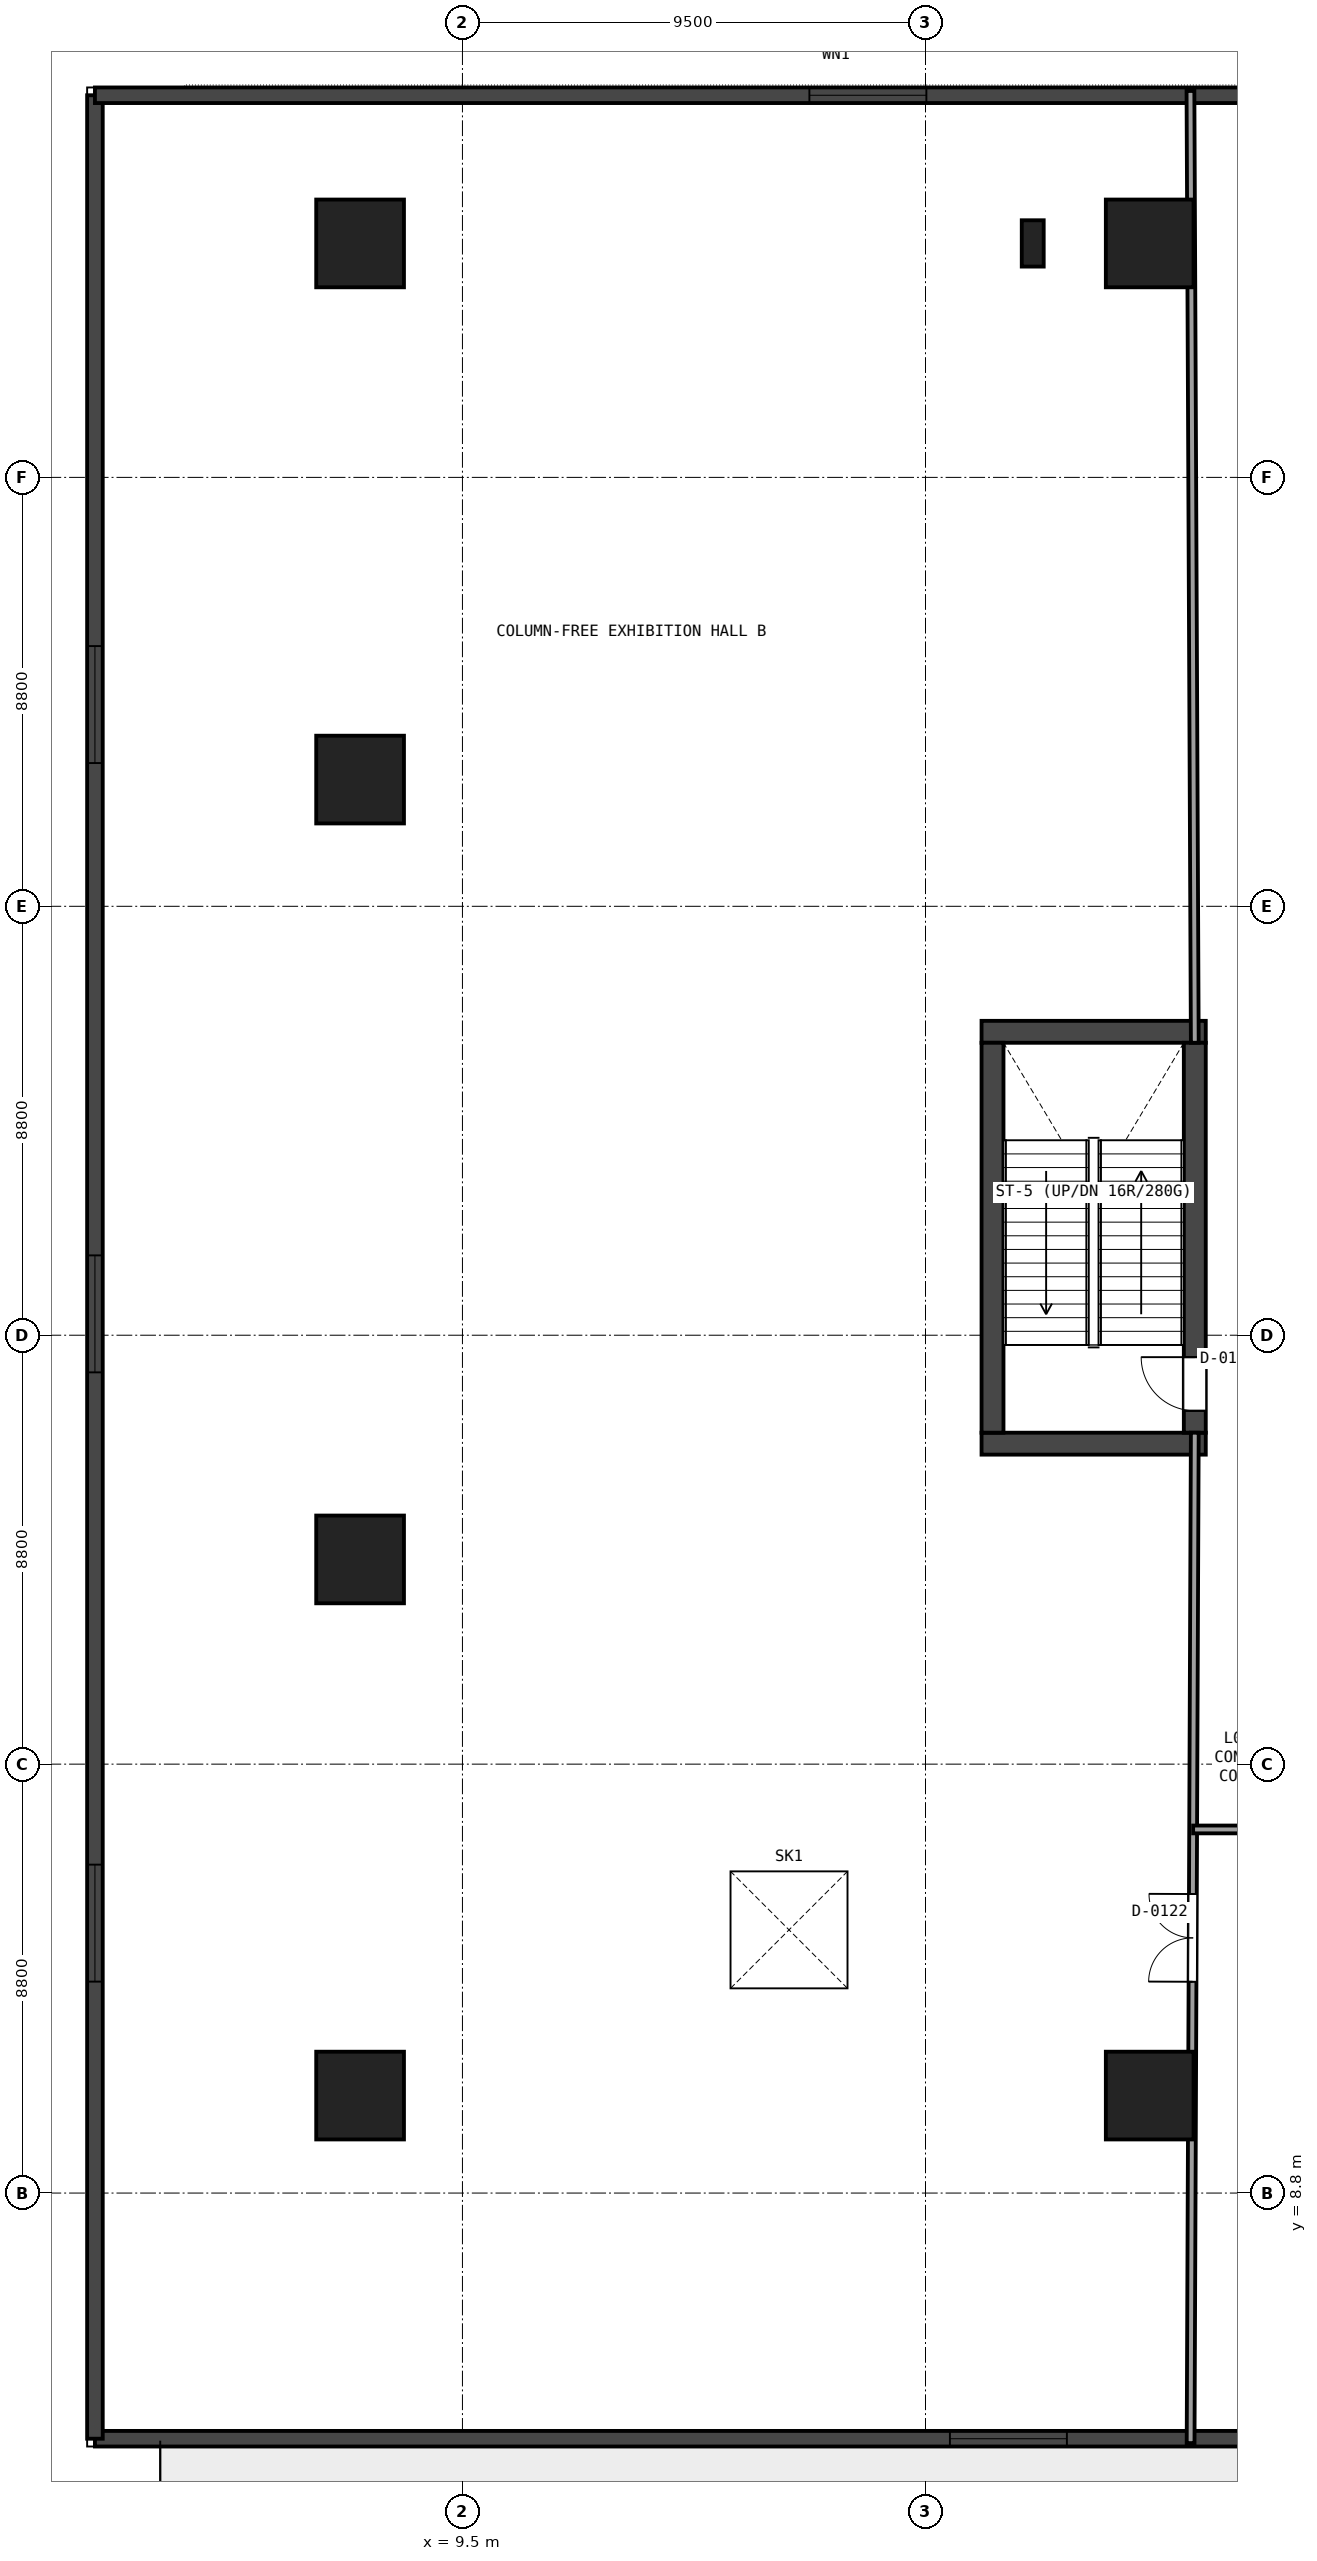
"""IFC4 building model, lengths in metres.
Left out: names, types, materials, properties, quantities, classifications, styles, units other than length and angle.
Written with IfcOpenShell. Run it as: python <this file> out.ifc"""

import sys

from ifc_helpers import new_model, si_unit, direction, frame, frame_2d, origin, origin_2d, place, context, subcontext, project, spatial, rectangle, extrude, element, fill, save


model = new_model("IFC4")
c1 = context("Model", 3, precision=1e-05, world=origin(), true_north=direction((0.0, 1.0)))
c2 = subcontext(c1, "Body", "Model", "MODEL_VIEW")
j1 = project(units=[si_unit("LENGTHUNIT", "METRE"), si_unit("PLANEANGLEUNIT", "RADIAN")], contexts=[c1])
p1 = place(None, origin())
s1 = spatial("IfcSite", under=j1, at=p1, CompositionType="ELEMENT")
p2 = place(p1, origin())
s2 = spatial("IfcBuilding", under=s1, at=p2, CompositionType="ELEMENT")
p3 = place(p2, frame((0.0, 0.0, 5.4)))
s3 = spatial("IfcBuildingStorey", under=s2, at=p3, CompositionType="ELEMENT", Elevation=5.4)
for number, where, z_axis, x_axis in (
    (1, (20.15, 24.175, 0.0), (0.0, 0.0, 1.0), (1.0, 0.0, 0.0)),
    (2, (20.15, 32.625, 0.0), (0.0, 0.0, 1.0), (1.0, 0.0, 0.0)),
):
    element("IfcWall", number, at=place(p3, frame(where, z_axis=z_axis, x_axis=x_axis)), inside=s3, PredefinedType="SHEAR", context=c2, shape_type="SweptSolid", body=[
        extrude(rectangle(XDim=4.6, YDim=0.45, at=frame_2d((2.3, 0.0))), origin(), (0.0, 0.0, 1.0), 5.05),
    ])
p4 = place(p3, frame((20.375, 24.4, 0.0), z_axis=(0.0, 0.0, 1.0), x_axis=(0.0, 1.0, 0.0)))
e3 = element("IfcWall", 3, at=p4, inside=s3, PredefinedType="SHEAR", context=c2, shape_type="SweptSolid", body=[
    extrude(rectangle(XDim=8.0, YDim=0.45, at=frame_2d((4.0, 0.0))), origin(), (0.0, 0.0, 1.0), 5.05),
])
p5 = place(p3, frame((24.525, 24.4, 0.0), z_axis=(0.0, 0.0, 1.0), x_axis=(0.0, 1.0, 0.0)))
e4 = element("IfcWall", 4, at=p5, inside=s3, PredefinedType="SHEAR", context=c2, shape_type="SweptSolid", body=[
    extrude(rectangle(XDim=8.0, YDim=0.45, at=frame_2d((4.0, 0.0))), origin(), (0.0, 0.0, 1.0), 5.05),
])
p6 = place(p5, frame((0.45, 0.0, 0.0)))
e5 = element("IfcOpeningElement", 5, at=p6, cuts=e4, PredefinedType="OPENING", context=c2, shape_type="SweptSolid", body=[
    extrude(rectangle(XDim=1.1, YDim=2.15, at=frame_2d((0.55, 1.075))), frame((0.0, 0.235, 0.0), z_axis=(0.0, -1.0, 0.0), x_axis=(1.0, 0.0, 0.0)), (0.0, 0.0, 1.0), 0.47),
])
for number, where, z_axis, x_axis in (
    (6, (7.4, 10.8, 0.0), (0.0, 0.0, 1.0), (1.0, 0.0, 0.0)),
    (7, (23.6, 10.8, 0.0), (0.0, 0.0, 1.0), (1.0, 0.0, 0.0)),
    (8, (23.6, 48.8, 0.0), (0.0, 0.0, 1.0), (1.0, 0.0, 0.0)),
    (9, (7.4, 48.8, 0.0), (0.0, 0.0, 1.0), (1.0, 0.0, 0.0)),
    (10, (7.4, 37.8, 0.0), (0.0, 0.0, 1.0), (1.0, 0.0, 0.0)),
    (11, (7.4, 21.8, 0.0), (0.0, 0.0, 1.0), (1.0, 0.0, 0.0)),
):
    element("IfcColumn", number, at=place(p3, frame(where, z_axis=z_axis, x_axis=x_axis)), inside=s3, PredefinedType="COLUMN", context=c2, shape_type="SweptSolid", body=[
        extrude(rectangle(XDim=1.8, YDim=1.8, at=origin_2d()), origin(), (0.0, 0.0, 1.0), 5.05),
    ])
p7 = place(p3, frame((21.2, 48.8, 0.0), z_axis=(0.0, 0.0, 1.0), x_axis=(1.0, 0.0, 0.0)))
e12 = element("IfcColumn", 12, at=p7, inside=s3, PredefinedType="PILASTER", context=c2, shape_type="SweptSolid", body=[
    extrude(rectangle(XDim=0.45, YDim=0.95, at=origin_2d()), origin(), (0.0, 0.0, 1.0), 5.05),
])
p8 = place(p3, frame((74.04, 3.76, 0.0), z_axis=(0.0, 0.0, 1.0), x_axis=(-1.0, 0.0, 0.0)))
e13 = element("IfcWall", 13, at=p8, inside=s3, PredefinedType="SOLIDWALL", context=c2, shape_type="SweptSolid", body=[
    extrude(rectangle(XDim=72.08, YDim=0.32, at=frame_2d((36.04, 0.0))), origin(), (0.0, 0.0, 1.0), 5.05),
])
p9 = place(p8, frame((14.658, 0.0, 0.95)))
e14 = element("IfcOpeningElement", 14, at=p9, cuts=e13, PredefinedType="OPENING", context=c2, shape_type="SweptSolid", body=[
    extrude(rectangle(XDim=2.4, YDim=2.5, at=frame_2d((1.2, 1.25))), frame((0.0, 0.17, 0.0), z_axis=(0.0, -1.0, 0.0), x_axis=(1.0, 0.0, 0.0)), (0.0, 0.0, 1.0), 0.34),
])
p10 = place(p8, frame((52.139, 0.0, 0.95)))
e15 = element("IfcOpeningElement", 15, at=p10, cuts=e13, PredefinedType="OPENING", context=c2, shape_type="SweptSolid", body=[
    extrude(rectangle(XDim=2.4, YDim=2.5, at=frame_2d((1.2, 1.25))), frame((0.0, 0.17, 0.0), z_axis=(0.0, -1.0, 0.0), x_axis=(1.0, 0.0, 0.0)), (0.0, 0.0, 1.0), 0.34),
])
p11 = place(p8, frame((38.44, 0.0, 0.0)))
e16 = element("IfcOpeningElement", 16, at=p11, cuts=e13, PredefinedType="OPENING", context=c2, shape_type="SweptSolid", body=[
    extrude(rectangle(XDim=1.2, YDim=2.2, at=frame_2d((0.6, 1.1))), frame((0.0, 0.17, 0.0), z_axis=(0.0, -1.0, 0.0), x_axis=(1.0, 0.0, 0.0)), (0.0, 0.0, 1.0), 0.34),
])
p12 = place(p3, frame((1.96, 3.76, 0.0), z_axis=(0.0, 0.0, 1.0), x_axis=(0.0, 1.0, 0.0)))
e17 = element("IfcWall", 17, at=p12, inside=s3, PredefinedType="SOLIDWALL", context=c2, shape_type="SweptSolid", body=[
    extrude(rectangle(XDim=48.08, YDim=0.32, at=frame_2d((24.04, 0.0))), origin(), (0.0, 0.0, 1.0), 5.05),
])
p13 = place(p12, frame((9.378, 0.0, 0.95)))
e18 = element("IfcOpeningElement", 18, at=p13, cuts=e17, PredefinedType="OPENING", context=c2, shape_type="SweptSolid", body=[
    extrude(rectangle(XDim=2.4, YDim=2.5, at=frame_2d((1.2, 1.25))), frame((0.0, 0.17, 0.0), z_axis=(0.0, -1.0, 0.0), x_axis=(1.0, 0.0, 0.0)), (0.0, 0.0, 1.0), 0.34),
])
p14 = place(p12, frame((21.878, 0.0, 0.95)))
e19 = element("IfcOpeningElement", 19, at=p14, cuts=e17, PredefinedType="OPENING", context=c2, shape_type="SweptSolid", body=[
    extrude(rectangle(XDim=2.4, YDim=2.5, at=frame_2d((1.2, 1.25))), frame((0.0, 0.17, 0.0), z_axis=(0.0, -1.0, 0.0), x_axis=(1.0, 0.0, 0.0)), (0.0, 0.0, 1.0), 0.34),
])
p15 = place(p12, frame((34.379, 0.0, 0.95)))
e20 = element("IfcOpeningElement", 20, at=p15, cuts=e17, PredefinedType="OPENING", context=c2, shape_type="SweptSolid", body=[
    extrude(rectangle(XDim=2.4, YDim=2.5, at=frame_2d((1.2, 1.25))), frame((0.0, 0.17, 0.0), z_axis=(0.0, -1.0, 0.0), x_axis=(1.0, 0.0, 0.0)), (0.0, 0.0, 1.0), 0.34),
])
p16 = place(p3, frame((1.96, 51.84, 0.0), z_axis=(0.0, 0.0, 1.0), x_axis=(1.0, 0.0, 0.0)))
e21 = element("IfcWall", 21, at=p16, inside=s3, PredefinedType="SOLIDWALL", context=c2, shape_type="SweptSolid", body=[
    extrude(rectangle(XDim=72.08, YDim=0.32, at=frame_2d((36.04, 0.0))), origin(), (0.0, 0.0, 1.0), 5.05),
])
p17 = place(p16, frame((14.658, 0.0, 0.95)))
e22 = element("IfcOpeningElement", 22, at=p17, cuts=e21, PredefinedType="OPENING", context=c2, shape_type="SweptSolid", body=[
    extrude(rectangle(XDim=2.4, YDim=2.5, at=frame_2d((1.2, 1.25))), frame((0.0, 0.17, 0.0), z_axis=(0.0, -1.0, 0.0), x_axis=(1.0, 0.0, 0.0)), (0.0, 0.0, 1.0), 0.34),
])
p18 = place(p16, frame((33.398, 0.0, 0.95)))
e23 = element("IfcOpeningElement", 23, at=p18, cuts=e21, PredefinedType="OPENING", context=c2, shape_type="SweptSolid", body=[
    extrude(rectangle(XDim=2.4, YDim=2.5, at=frame_2d((1.2, 1.25))), frame((0.0, 0.17, 0.0), z_axis=(0.0, -1.0, 0.0), x_axis=(1.0, 0.0, 0.0)), (0.0, 0.0, 1.0), 0.34),
])
p19 = place(p16, frame((52.139, 0.0, 0.95)))
e24 = element("IfcOpeningElement", 24, at=p19, cuts=e21, PredefinedType="OPENING", context=c2, shape_type="SweptSolid", body=[
    extrude(rectangle(XDim=2.4, YDim=2.5, at=frame_2d((1.2, 1.25))), frame((0.0, 0.17, 0.0), z_axis=(0.0, -1.0, 0.0), x_axis=(1.0, 0.0, 0.0)), (0.0, 0.0, 1.0), 0.34),
])
p20 = place(p3, frame((24.439, 3.67, 0.0), z_axis=(0.0, 0.0, 1.0), x_axis=(0.004145530271, 0.999991407252, 0.0)))
e25 = element("IfcWall", 25, at=p20, inside=s3, PredefinedType="PARTITIONING", context=c2, shape_type="SweptSolid", body=[
    extrude(rectangle(XDim=20.73, YDim=0.16, at=frame_2d((10.365, 0.0))), origin(), (0.0, 0.0, 1.0), 4.123),
])
p21 = place(p20, frame((9.465, 0.0, 0.0)))
e26 = element("IfcOpeningElement", 26, at=p21, cuts=e25, PredefinedType="OPENING", context=c2, shape_type="SweptSolid", body=[
    extrude(rectangle(XDim=1.8, YDim=2.25, at=frame_2d((0.9, 1.125))), frame((0.0, 0.09, 0.0), z_axis=(0.0, -1.0, 0.0), x_axis=(1.0, 0.0, 0.0)), (0.0, 0.0, 1.0), 0.18),
])
p22 = place(p3, frame((24.525, 32.4, 0.0), z_axis=(0.0, 0.0, 1.0), x_axis=(-0.004550692375, 0.999989645546, 0.0)))
e27 = element("IfcWall", 27, at=p22, inside=s3, PredefinedType="PARTITIONING", context=c2, shape_type="SweptSolid", body=[
    extrude(rectangle(XDim=19.528, YDim=0.16, at=frame_2d((9.764, 0.0))), origin(), (0.0, 0.0, 1.0), 4.123),
])
p23 = place(p3, frame((57.4, 16.26, 0.0), z_axis=(0.0, 0.0, 1.0), x_axis=(-1.0, 0.0, 0.0)))
e28 = element("IfcWall", 28, at=p23, inside=s3, PredefinedType="PARTITIONING", context=c2, shape_type="SweptSolid", body=[
    extrude(rectangle(XDim=32.909, YDim=0.16, at=frame_2d((16.455, 0.0))), origin(), (0.0, 0.0, 1.0), 4.203),
])
p24 = place(p23, frame((15.955, 0.0, 0.0)))
e29 = element("IfcOpeningElement", 29, at=p24, cuts=e28, PredefinedType="OPENING", context=c2, shape_type="SweptSolid", body=[
    extrude(rectangle(XDim=1.0, YDim=2.15, at=frame_2d((0.5, 1.075))), frame((0.0, 0.09, 0.0), z_axis=(0.0, -1.0, 0.0), x_axis=(1.0, 0.0, 0.0)), (0.0, 0.0, 1.0), 0.18),
])
p25 = place(p17, origin())
e30 = element("IfcWindow", 30, at=p25, inside=s3, PartitioningType="SINGLE_PANEL", PredefinedType="WINDOW", context=c2, shape_type="SweptSolid", body=[
    extrude(rectangle(XDim=2.4, YDim=2.5, at=frame_2d((1.2, 1.25))), frame((0.0, 0.03, 0.0), z_axis=(0.0, -1.0, 0.0), x_axis=(1.0, 0.0, 0.0)), (0.0, 0.0, 1.0), 0.06),
])
fill(e22, e30)
p26 = place(p10, origin())
e31 = element("IfcWindow", 31, at=p26, inside=s3, PartitioningType="SINGLE_PANEL", PredefinedType="WINDOW", context=c2, shape_type="SweptSolid", body=[
    extrude(rectangle(XDim=2.4, YDim=2.5, at=frame_2d((1.2, 1.25))), frame((0.0, 0.03, 0.0), z_axis=(0.0, -1.0, 0.0), x_axis=(1.0, 0.0, 0.0)), (0.0, 0.0, 1.0), 0.06),
])
fill(e15, e31)
p27 = place(p13, origin())
e32 = element("IfcWindow", 32, at=p27, inside=s3, PartitioningType="SINGLE_PANEL", PredefinedType="WINDOW", context=c2, shape_type="SweptSolid", body=[
    extrude(rectangle(XDim=2.4, YDim=2.5, at=frame_2d((1.2, 1.25))), frame((0.0, 0.03, 0.0), z_axis=(0.0, -1.0, 0.0), x_axis=(1.0, 0.0, 0.0)), (0.0, 0.0, 1.0), 0.06),
])
fill(e18, e32)
p28 = place(p14, origin())
e33 = element("IfcWindow", 33, at=p28, inside=s3, PartitioningType="SINGLE_PANEL", PredefinedType="WINDOW", context=c2, shape_type="SweptSolid", body=[
    extrude(rectangle(XDim=2.4, YDim=2.5, at=frame_2d((1.2, 1.25))), frame((0.0, 0.03, 0.0), z_axis=(0.0, -1.0, 0.0), x_axis=(1.0, 0.0, 0.0)), (0.0, 0.0, 1.0), 0.06),
])
fill(e19, e33)
p29 = place(p15, origin())
e34 = element("IfcWindow", 34, at=p29, inside=s3, PartitioningType="SINGLE_PANEL", PredefinedType="WINDOW", context=c2, shape_type="SweptSolid", body=[
    extrude(rectangle(XDim=2.4, YDim=2.5, at=frame_2d((1.2, 1.25))), frame((0.0, 0.03, 0.0), z_axis=(0.0, -1.0, 0.0), x_axis=(1.0, 0.0, 0.0)), (0.0, 0.0, 1.0), 0.06),
])
fill(e20, e34)
p30 = place(p3, frame((0.0, 0.0, -0.35)))
p31 = place(p30, frame((16.2, 14.2, 0.0)))
p32 = place(p31, frame((0.0, 0.0, 0.3)))
e35 = element("IfcWindow", 35, at=p32, inside=s3, PartitioningType="SINGLE_PANEL", PredefinedType="SKYLIGHT", context=c2, shape_type="SweptSolid", body=[
    extrude(rectangle(XDim=2.4, YDim=2.4, at=origin_2d()), origin(), (0.0, 0.0, 1.0), 0.05),
])
p33 = place(p6, origin())
e36 = element("IfcDoor", 36, at=p33, inside=s3, OperationType="SINGLE_SWING_RIGHT", PredefinedType="DOOR", context=c2, shape_type="SweptSolid", body=[
    extrude(rectangle(XDim=1.1, YDim=2.15, at=frame_2d((0.55, 1.075))), frame((0.0, 0.025, 0.0), z_axis=(0.0, -1.0, 0.0), x_axis=(1.0, 0.0, 0.0)), (0.0, 0.0, 1.0), 0.05),
])
fill(e5, e36)
p34 = place(p21, origin())
e37 = element("IfcDoor", 37, at=p34, inside=s3, OperationType="DOUBLE_DOOR_SINGLE_SWING", PredefinedType="DOOR", context=c2, shape_type="SweptSolid", body=[
    extrude(rectangle(XDim=1.8, YDim=2.25, at=frame_2d((0.9, 1.125))), frame((0.0, 0.025, 0.0), z_axis=(0.0, -1.0, 0.0), x_axis=(1.0, 0.0, 0.0)), (0.0, 0.0, 1.0), 0.05),
])
fill(e26, e37)
save(model, sys.argv[1])
